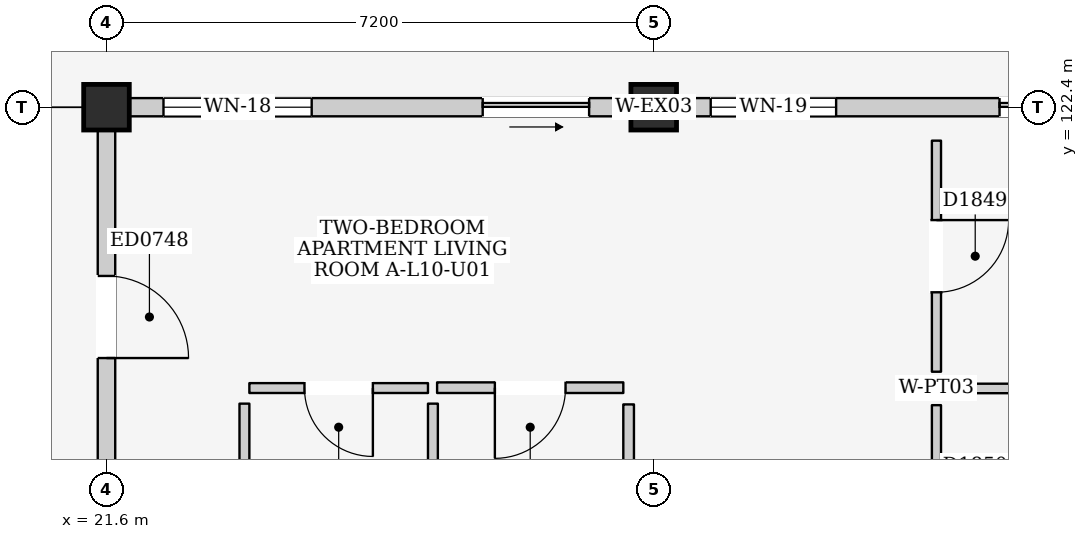
"""IFC4 building model, lengths in metres.
Left out: names, types, materials, properties, quantities, classifications, styles, units other than length and angle.
Written with IfcOpenShell. Run it as: python <this file> out.ifc"""

import sys

from ifc_helpers import new_model, si_unit, direction, frame, frame_2d, origin, origin_2d, place, context, subcontext, project, spatial, rectangle, extrude, element, fill, save


model = new_model("IFC4")
c1 = context("Model", 3, precision=1e-05, world=origin(), true_north=direction((0.0, 1.0)))
c2 = subcontext(c1, "Body", "Model", "MODEL_VIEW")
j1 = project(units=[si_unit("LENGTHUNIT", "METRE"), si_unit("PLANEANGLEUNIT", "RADIAN")], contexts=[c1])
p1 = place(None, origin())
s1 = spatial("IfcSite", under=j1, at=p1, CompositionType="ELEMENT")
p2 = place(p1, origin())
s2 = spatial("IfcBuilding", under=s1, at=p2, CompositionType="ELEMENT")
p3 = place(p2, frame((0.0, 0.0, 34.8)))
s3 = spatial("IfcBuildingStorey", under=s2, at=p3, CompositionType="ELEMENT", Elevation=34.8)
for number, where, z_axis, x_axis in (
    (1, (21.6, 122.4, 0.0), (0.0, 0.0, 1.0), (1.0, 0.0, 0.0)),
    (2, (28.8, 122.4, 0.0), (0.0, 0.0, 1.0), (1.0, 0.0, 0.0)),
):
    element("IfcColumn", number, at=place(p3, frame(where, z_axis=z_axis, x_axis=x_axis)), inside=s3, PredefinedType="COLUMN", context=c2, shape_type="SweptSolid", body=[
        extrude(rectangle(XDim=0.6, YDim=0.6, at=origin_2d()), origin(), (0.0, 0.0, 1.0), 3.2),
    ])
p4 = place(p3, frame((21.9, 122.4, 0.0), z_axis=(0.0, 0.0, 1.0), x_axis=(1.0, 0.0, 0.0)))
e3 = element("IfcWall", 3, at=p4, inside=s3, PredefinedType="ELEMENTEDWALL", context=c2, shape_type="SweptSolid", body=[
    extrude(rectangle(XDim=6.6, YDim=0.24, at=frame_2d((3.3, 0.0))), origin(), (0.0, 0.0, 1.0), 2.495),
])
p5 = place(p4, frame((4.65, 0.0, 0.0)))
e4 = element("IfcOpeningElement", 4, at=p5, cuts=e3, PredefinedType="OPENING", context=c2, shape_type="SweptSolid", body=[
    extrude(rectangle(XDim=1.4, YDim=2.1, at=frame_2d((0.7, 1.05))), frame((0.0, 0.135, 0.0), z_axis=(0.0, -1.0, 0.0), x_axis=(1.0, 0.0, 0.0)), (0.0, 0.0, 1.0), 0.27),
])
p6 = place(p4, frame((0.45, 0.0, 0.835)))
e5 = element("IfcOpeningElement", 5, at=p6, cuts=e3, PredefinedType="OPENING", context=c2, shape_type="SweptSolid", body=[
    extrude(rectangle(XDim=1.95, YDim=1.55, at=frame_2d((0.975, 0.775))), frame((0.0, 0.135, 0.0), z_axis=(0.0, -1.0, 0.0), x_axis=(1.0, 0.0, 0.0)), (0.0, 0.0, 1.0), 0.27),
])
p7 = place(p3, frame((29.1, 122.4, 0.0), z_axis=(0.0, 0.0, 1.0), x_axis=(1.0, 0.0, 0.0)))
e6 = element("IfcWall", 6, at=p7, inside=s3, PredefinedType="ELEMENTEDWALL", context=c2, shape_type="SweptSolid", body=[
    extrude(rectangle(XDim=6.6, YDim=0.24, at=frame_2d((3.3, 0.0))), origin(), (0.0, 0.0, 1.0), 2.495),
])
p8 = place(p7, frame((4.25, 0.0, 0.0)))
e7 = element("IfcOpeningElement", 7, at=p8, cuts=e6, PredefinedType="OPENING", context=c2, shape_type="SweptSolid", body=[
    extrude(rectangle(XDim=1.8, YDim=2.12, at=frame_2d((0.9, 1.06))), frame((0.0, 0.135, 0.0), z_axis=(0.0, -1.0, 0.0), x_axis=(1.0, 0.0, 0.0)), (0.0, 0.0, 1.0), 0.27),
])
p9 = place(p7, frame((0.45, 0.0, 0.9)))
e8 = element("IfcOpeningElement", 8, at=p9, cuts=e6, PredefinedType="OPENING", context=c2, shape_type="SweptSolid", body=[
    extrude(rectangle(XDim=1.65, YDim=1.35, at=frame_2d((0.825, 0.675))), frame((0.0, 0.135, 0.0), z_axis=(0.0, -1.0, 0.0), x_axis=(1.0, 0.0, 0.0)), (0.0, 0.0, 1.0), 0.27),
])
p10 = place(p3, frame((21.6, 115.5, 0.0), z_axis=(0.0, 0.0, 1.0), x_axis=(0.0, 1.0, 0.0)))
e9 = element("IfcWall", 9, at=p10, inside=s3, PredefinedType="ELEMENTEDWALL", context=c2, shape_type="SweptSolid", body=[
    extrude(rectangle(XDim=6.6, YDim=0.23, at=frame_2d((3.3, 0.0))), origin(), (0.0, 0.0, 1.0), 2.445),
])
p11 = place(p10, frame((3.6, 0.0, 0.0)))
e10 = element("IfcOpeningElement", 10, at=p11, cuts=e9, PredefinedType="OPENING", context=c2, shape_type="SweptSolid", body=[
    extrude(rectangle(XDim=1.08, YDim=2.12, at=frame_2d((0.54, 1.06))), frame((0.0, 0.13, 0.0), z_axis=(0.0, -1.0, 0.0), x_axis=(1.0, 0.0, 0.0)), (0.0, 0.0, 1.0), 0.26),
])
p12 = place(p3, frame((23.48, 118.705, 0.0), z_axis=(0.0, 0.0, 1.0), x_axis=(1.0, 0.0, 0.0)))
e11 = element("IfcWall", 11, at=p12, inside=s3, PredefinedType="PARTITIONING", context=c2, shape_type="SweptSolid", body=[
    extrude(rectangle(XDim=2.35, YDim=0.13, at=frame_2d((1.175, 0.0))), origin(), (0.0, 0.0, 1.0), 2.96),
])
p13 = place(p12, frame((0.725, 0.0, 0.0)))
e12 = element("IfcOpeningElement", 12, at=p13, cuts=e11, PredefinedType="OPENING", context=c2, shape_type="SweptSolid", body=[
    extrude(rectangle(XDim=0.9, YDim=2.1, at=frame_2d((0.45, 1.05))), frame((0.0, 0.08, 0.0), z_axis=(0.0, -1.0, 0.0), x_axis=(1.0, 0.0, 0.0)), (0.0, 0.0, 1.0), 0.16),
])
for number, where, z_axis, x_axis in (
    (13, (25.895, 115.46, 0.0), (0.0, 0.0, 1.0), (0.0, 1.0, 0.0)),
    (14, (23.415, 115.46, 0.0), (0.0, 0.0, 1.0), (0.0, 1.0, 0.0)),
):
    element("IfcWall", number, at=place(p3, frame(where, z_axis=z_axis, x_axis=x_axis)), inside=s3, PredefinedType="PARTITIONING", context=c2, shape_type="SweptSolid", body=[
        extrude(rectangle(XDim=3.04, YDim=0.13, at=frame_2d((1.52, 0.0))), origin(), (0.0, 0.0, 1.0), 2.96),
    ])
p14 = place(p3, frame((25.95, 118.71, 0.0), z_axis=(0.0, 0.0, 1.0), x_axis=(1.0, 0.0, 0.0)))
e15 = element("IfcWall", 15, at=p14, inside=s3, PredefinedType="PARTITIONING", context=c2, shape_type="SweptSolid", body=[
    extrude(rectangle(XDim=2.45, YDim=0.14, at=frame_2d((1.225, 0.0))), origin(), (0.0, 0.0, 1.0), 2.96),
])
p15 = place(p14, frame((0.76, 0.0, 0.0)))
e16 = element("IfcOpeningElement", 16, at=p15, cuts=e15, PredefinedType="OPENING", context=c2, shape_type="SweptSolid", body=[
    extrude(rectangle(XDim=0.93, YDim=2.14, at=frame_2d((0.465, 1.07))), frame((0.0, 0.085, 0.0), z_axis=(0.0, -1.0, 0.0), x_axis=(1.0, 0.0, 0.0)), (0.0, 0.0, 1.0), 0.17),
])
p16 = place(p3, frame((28.47, 115.53, 0.0), z_axis=(0.0, 0.0, 1.0), x_axis=(0.0, 1.0, 0.0)))
e17 = element("IfcWall", 17, at=p16, inside=s3, PredefinedType="PARTITIONING", context=c2, shape_type="SweptSolid", body=[
    extrude(rectangle(XDim=2.96, YDim=0.14, at=frame_2d((1.48, 0.0))), origin(), (0.0, 0.0, 1.0), 2.96),
])
p17 = place(p3, frame((32.52, 118.92, 0.0), z_axis=(0.0, 0.0, 1.0), x_axis=(0.0, 1.0, 0.0)))
e18 = element("IfcWall", 18, at=p17, inside=s3, PredefinedType="PARTITIONING", context=c2, shape_type="SweptSolid", body=[
    extrude(rectangle(XDim=3.04, YDim=0.12, at=frame_2d((1.52, 0.0))), origin(), (0.0, 0.0, 1.0), 2.96),
])
p18 = place(p17, frame((1.045, 0.0, 0.0)))
e19 = element("IfcOpeningElement", 19, at=p18, cuts=e18, PredefinedType="OPENING", context=c2, shape_type="SweptSolid", body=[
    extrude(rectangle(XDim=0.95, YDim=2.15, at=frame_2d((0.475, 1.075))), frame((0.0, 0.075, 0.0), z_axis=(0.0, -1.0, 0.0), x_axis=(1.0, 0.0, 0.0)), (0.0, 0.0, 1.0), 0.15),
])
p19 = place(p3, frame((32.72, 118.7, 0.0), z_axis=(0.0, 0.0, 1.0), x_axis=(1.0, 0.0, 0.0)))
e20 = element("IfcWall", 20, at=p19, inside=s3, PredefinedType="PARTITIONING", context=c2, shape_type="SweptSolid", body=[
    extrude(rectangle(XDim=3.06, YDim=0.125, at=frame_2d((1.53, 0.0))), origin(), (0.0, 0.0, 1.0), 2.96),
])
p20 = place(p3, frame((32.52, 115.44, 0.0), z_axis=(0.0, 0.0, 1.0), x_axis=(0.0, 1.0, 0.0)))
e21 = element("IfcWall", 21, at=p20, inside=s3, PredefinedType="PARTITIONING", context=c2, shape_type="SweptSolid", body=[
    extrude(rectangle(XDim=3.04, YDim=0.12, at=frame_2d((1.52, 0.0))), origin(), (0.0, 0.0, 1.0), 2.96),
])
p21 = place(p20, frame((1.04, 0.0, 0.0)))
e22 = element("IfcOpeningElement", 22, at=p21, cuts=e21, PredefinedType="OPENING", context=c2, shape_type="SweptSolid", body=[
    extrude(rectangle(XDim=0.96, YDim=2.15, at=frame_2d((0.48, 1.075))), frame((0.0, 0.075, 0.0), z_axis=(0.0, -1.0, 0.0), x_axis=(1.0, 0.0, 0.0)), (0.0, 0.0, 1.0), 0.15),
])
p22 = place(p5, frame((1.4, 0.0, 0.0), z_axis=(0.0, 0.0, 1.0), x_axis=(-1.0, 0.0, 0.0)))
e23 = element("IfcDoor", 23, at=p22, inside=s3, OperationType="SLIDING_TO_RIGHT", PredefinedType="DOOR", context=c2, shape_type="SweptSolid", body=[
    extrude(rectangle(XDim=1.4, YDim=2.1, at=frame_2d((0.7, 1.05))), frame((0.0, 0.025, 0.0), z_axis=(0.0, -1.0, 0.0), x_axis=(1.0, 0.0, 0.0)), (0.0, 0.0, 1.0), 0.05),
])
fill(e4, e23)
p23 = place(p6, origin())
e24 = element("IfcWindow", 24, at=p23, inside=s3, PartitioningType="DOUBLE_PANEL_VERTICAL", PredefinedType="WINDOW", context=c2, shape_type="SweptSolid", body=[
    extrude(rectangle(XDim=1.95, YDim=1.55, at=frame_2d((0.975, 0.775))), frame((0.0, 0.03, 0.0), z_axis=(0.0, -1.0, 0.0), x_axis=(1.0, 0.0, 0.0)), (0.0, 0.0, 1.0), 0.06),
])
fill(e5, e24)
p24 = place(p8, frame((1.8, 0.0, 0.0), z_axis=(0.0, 0.0, 1.0), x_axis=(-1.0, 0.0, 0.0)))
e25 = element("IfcDoor", 25, at=p24, inside=s3, OperationType="SLIDING_TO_LEFT", PredefinedType="DOOR", context=c2, shape_type="SweptSolid", body=[
    extrude(rectangle(XDim=1.8, YDim=2.12, at=frame_2d((0.9, 1.06))), frame((0.0, 0.025, 0.0), z_axis=(0.0, -1.0, 0.0), x_axis=(1.0, 0.0, 0.0)), (0.0, 0.0, 1.0), 0.05),
])
fill(e7, e25)
p25 = place(p9, origin())
e26 = element("IfcWindow", 26, at=p25, inside=s3, PartitioningType="DOUBLE_PANEL_VERTICAL", PredefinedType="WINDOW", context=c2, shape_type="SweptSolid", body=[
    extrude(rectangle(XDim=1.65, YDim=1.35, at=frame_2d((0.825, 0.675))), frame((0.0, 0.03, 0.0), z_axis=(0.0, -1.0, 0.0), x_axis=(1.0, 0.0, 0.0)), (0.0, 0.0, 1.0), 0.06),
])
fill(e8, e26)
p26 = place(p11, frame((1.08, 0.0, 0.0), z_axis=(0.0, 0.0, 1.0), x_axis=(-1.0, 0.0, 0.0)))
e27 = element("IfcDoor", 27, at=p26, inside=s3, OperationType="SINGLE_SWING_RIGHT", PredefinedType="DOOR", context=c2, shape_type="SweptSolid", body=[
    extrude(rectangle(XDim=1.08, YDim=2.12, at=frame_2d((0.54, 1.06))), frame((0.0, 0.025, 0.0), z_axis=(0.0, -1.0, 0.0), x_axis=(1.0, 0.0, 0.0)), (0.0, 0.0, 1.0), 0.05),
])
fill(e10, e27)
p27 = place(p13, frame((0.9, 0.0, 0.0), z_axis=(0.0, 0.0, 1.0), x_axis=(-1.0, 0.0, 0.0)))
e28 = element("IfcDoor", 28, at=p27, inside=s3, OperationType="SINGLE_SWING_LEFT", PredefinedType="DOOR", context=c2, shape_type="SweptSolid", body=[
    extrude(rectangle(XDim=0.9, YDim=2.1, at=frame_2d((0.45, 1.05))), frame((0.0, 0.025, 0.0), z_axis=(0.0, -1.0, 0.0), x_axis=(1.0, 0.0, 0.0)), (0.0, 0.0, 1.0), 0.05),
])
fill(e12, e28)
p28 = place(p15, frame((0.93, 0.0, 0.0), z_axis=(0.0, 0.0, 1.0), x_axis=(-1.0, 0.0, 0.0)))
e29 = element("IfcDoor", 29, at=p28, inside=s3, OperationType="SINGLE_SWING_RIGHT", PredefinedType="DOOR", context=c2, shape_type="SweptSolid", body=[
    extrude(rectangle(XDim=0.93, YDim=2.14, at=frame_2d((0.465, 1.07))), frame((0.0, 0.025, 0.0), z_axis=(0.0, -1.0, 0.0), x_axis=(1.0, 0.0, 0.0)), (0.0, 0.0, 1.0), 0.05),
])
fill(e16, e29)
p29 = place(p18, frame((0.95, 0.0, 0.0), z_axis=(0.0, 0.0, 1.0), x_axis=(-1.0, 0.0, 0.0)))
e30 = element("IfcDoor", 30, at=p29, inside=s3, OperationType="SINGLE_SWING_LEFT", PredefinedType="DOOR", context=c2, shape_type="SweptSolid", body=[
    extrude(rectangle(XDim=0.95, YDim=2.15, at=frame_2d((0.475, 1.075))), frame((0.0, 0.025, 0.0), z_axis=(0.0, -1.0, 0.0), x_axis=(1.0, 0.0, 0.0)), (0.0, 0.0, 1.0), 0.05),
])
fill(e19, e30)
save(model, sys.argv[1])
